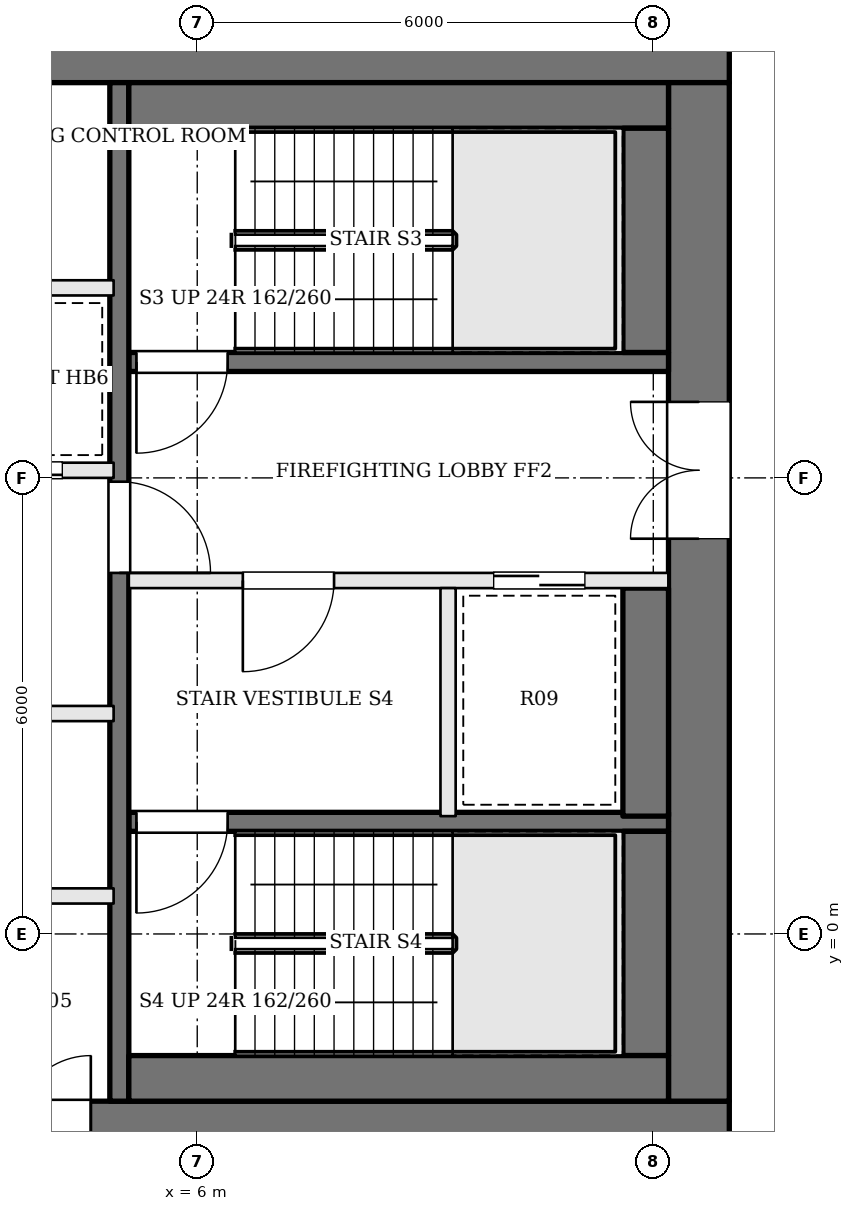
"""IFC4 building model, lengths in metres.
Left out: names, types, materials, properties, quantities, classifications, styles, units other than length and angle.
Written with IfcOpenShell. Run it as: python <this file> out.ifc"""

import sys

from ifc_helpers import new_model, si_unit, direction, frame, frame_2d, origin, place, context, subcontext, project, spatial, rectangle, extrude, element, fill, save


model = new_model("IFC4")
c1 = context("Model", 3, precision=1e-05, world=origin(), true_north=direction((0.0, 1.0)))
c2 = subcontext(c1, "Body", "Model", "MODEL_VIEW")
j1 = project(units=[si_unit("LENGTHUNIT", "METRE"), si_unit("PLANEANGLEUNIT", "RADIAN")], contexts=[c1])
p1 = place(None, origin())
s1 = spatial("IfcSite", under=j1, at=p1, CompositionType="ELEMENT")
p2 = place(p1, origin())
s2 = spatial("IfcBuilding", under=s1, at=p2, CompositionType="ELEMENT")
p3 = place(p2, frame((0.0, 0.0, 197.4)))
s3 = spatial("IfcBuildingStorey", under=s2, at=p3, CompositionType="ELEMENT", Elevation=197.4)
p4 = place(p3, frame((-13.0, 11.6, 0.0), z_axis=(0.0, 0.0, 1.0), x_axis=(1.0, 0.0, 0.0)))
e1 = element("IfcWall", 1, at=p4, inside=s3, PredefinedType="SHEAR", context=c2, shape_type="SweptSolid", body=[
    extrude(rectangle(XDim=26.0, YDim=0.8, at=frame_2d((13.0, 0.0))), origin(), (0.0, 0.0, 1.0), 3.9),
])
p5 = place(p4, frame((8.975, 0.0, 0.0)))
e2 = element("IfcOpeningElement", 2, at=p5, cuts=e1, PredefinedType="OPENING", context=c2, shape_type="SweptSolid", body=[
    extrude(rectangle(XDim=0.7, YDim=2.1, at=frame_2d((0.35, 1.05))), frame((0.0, 0.41, 0.0), z_axis=(0.0, -1.0, 0.0), x_axis=(1.0, 0.0, 0.0)), (0.0, 0.0, 1.0), 0.82),
])
p6 = place(p4, frame((11.025, 0.0, 0.0)))
e3 = element("IfcOpeningElement", 3, at=p6, cuts=e1, PredefinedType="OPENING", context=c2, shape_type="SweptSolid", body=[
    extrude(rectangle(XDim=0.7, YDim=2.1, at=frame_2d((0.35, 1.05))), frame((0.0, 0.41, 0.0), z_axis=(0.0, -1.0, 0.0), x_axis=(1.0, 0.0, 0.0)), (0.0, 0.0, 1.0), 0.82),
])
p7 = place(p4, frame((12.925, 0.0, 0.0)))
e4 = element("IfcOpeningElement", 4, at=p7, cuts=e1, PredefinedType="OPENING", context=c2, shape_type="SweptSolid", body=[
    extrude(rectangle(XDim=1.0, YDim=2.1, at=frame_2d((0.5, 1.05))), frame((0.0, 0.41, 0.0), z_axis=(0.0, -1.0, 0.0), x_axis=(1.0, 0.0, 0.0)), (0.0, 0.0, 1.0), 0.82),
])
p8 = place(p4, frame((15.775, 0.0, 0.0)))
e5 = element("IfcOpeningElement", 5, at=p8, cuts=e1, PredefinedType="OPENING", context=c2, shape_type="SweptSolid", body=[
    extrude(rectangle(XDim=1.0, YDim=2.1, at=frame_2d((0.5, 1.05))), frame((0.0, 0.41, 0.0), z_axis=(0.0, -1.0, 0.0), x_axis=(1.0, 0.0, 0.0)), (0.0, 0.0, 1.0), 0.82),
])
p9 = place(p3, frame((-13.0, -2.6, 0.0), z_axis=(0.0, 0.0, 1.0), x_axis=(1.0, 0.0, 0.0)))
e6 = element("IfcWall", 6, at=p9, inside=s3, PredefinedType="SHEAR", context=c2, shape_type="SweptSolid", body=[
    extrude(rectangle(XDim=26.0, YDim=0.8, at=frame_2d((13.0, 0.0))), origin(), (0.0, 0.0, 1.0), 3.9),
])
p10 = place(p9, frame((8.5, 0.0, 0.0)))
e7 = element("IfcOpeningElement", 7, at=p10, cuts=e6, PredefinedType="OPENING", context=c2, shape_type="SweptSolid", body=[
    extrude(rectangle(XDim=1.0, YDim=2.1, at=frame_2d((0.5, 1.05))), frame((0.0, 0.41, 0.0), z_axis=(0.0, -1.0, 0.0), x_axis=(1.0, 0.0, 0.0)), (0.0, 0.0, 1.0), 0.82),
])
p11 = place(p9, frame((11.025, 0.0, 0.0)))
e8 = element("IfcOpeningElement", 8, at=p11, cuts=e6, PredefinedType="OPENING", context=c2, shape_type="SweptSolid", body=[
    extrude(rectangle(XDim=0.9, YDim=2.1, at=frame_2d((0.45, 1.05))), frame((0.0, 0.41, 0.0), z_axis=(0.0, -1.0, 0.0), x_axis=(1.0, 0.0, 0.0)), (0.0, 0.0, 1.0), 0.82),
])
p12 = place(p9, frame((14.225, 0.0, 0.0)))
e9 = element("IfcOpeningElement", 9, at=p12, cuts=e6, PredefinedType="OPENING", context=c2, shape_type="SweptSolid", body=[
    extrude(rectangle(XDim=0.9, YDim=2.1, at=frame_2d((0.45, 1.05))), frame((0.0, 0.41, 0.0), z_axis=(0.0, -1.0, 0.0), x_axis=(1.0, 0.0, 0.0)), (0.0, 0.0, 1.0), 0.82),
])
p13 = place(p9, frame((16.6, 0.0, 0.0)))
e10 = element("IfcOpeningElement", 10, at=p13, cuts=e6, PredefinedType="OPENING", context=c2, shape_type="SweptSolid", body=[
    extrude(rectangle(XDim=1.0, YDim=2.1, at=frame_2d((0.5, 1.05))), frame((0.0, 0.41, 0.0), z_axis=(0.0, -1.0, 0.0), x_axis=(1.0, 0.0, 0.0)), (0.0, 0.0, 1.0), 0.82),
])
p14 = place(p3, frame((12.6, -2.2, 0.0), z_axis=(0.0, 0.0, 1.0), x_axis=(0.0, 1.0, 0.0)))
e11 = element("IfcWall", 11, at=p14, inside=s3, PredefinedType="SHEAR", context=c2, shape_type="SweptSolid", body=[
    extrude(rectangle(XDim=13.4, YDim=0.8, at=frame_2d((6.7, 0.0))), origin(), (0.0, 0.0, 1.0), 3.9),
])
p15 = place(p14, frame((7.4, 0.0, 0.0)))
e12 = element("IfcOpeningElement", 12, at=p15, cuts=e11, PredefinedType="OPENING", context=c2, shape_type="SweptSolid", body=[
    extrude(rectangle(XDim=1.8, YDim=2.1, at=frame_2d((0.9, 1.05))), frame((0.0, 0.41, 0.0), z_axis=(0.0, -1.0, 0.0), x_axis=(1.0, 0.0, 0.0)), (0.0, 0.0, 1.0), 0.82),
])
p16 = place(p3, frame((12.2, 7.525, 0.0), z_axis=(0.0, 0.0, 1.0), x_axis=(-1.0, 0.0, 0.0)))
e13 = element("IfcWall", 13, at=p16, inside=s3, PredefinedType="SOLIDWALL", context=c2, shape_type="SweptSolid", body=[
    extrude(rectangle(XDim=7.1, YDim=0.25, at=frame_2d((3.55, 0.0))), origin(), (0.0, 0.0, 1.0), 3.7),
])
p17 = place(p16, frame((5.8, 0.0, 0.0)))
e14 = element("IfcOpeningElement", 14, at=p17, cuts=e13, PredefinedType="OPENING", context=c2, shape_type="SweptSolid", body=[
    extrude(rectangle(XDim=1.2, YDim=2.1, at=frame_2d((0.6, 1.05))), frame((0.0, 0.135, 0.0), z_axis=(0.0, -1.0, 0.0), x_axis=(1.0, 0.0, 0.0)), (0.0, 0.0, 1.0), 0.27),
])
p18 = place(p3, frame((12.2, 4.65, 0.0), z_axis=(0.0, 0.0, 1.0), x_axis=(-1.0, 0.0, 0.0)))
e15 = element("IfcWall", 15, at=p18, inside=s3, PredefinedType="SOLIDWALL", context=c2, shape_type="SweptSolid", body=[
    extrude(rectangle(XDim=7.1, YDim=0.2, at=frame_2d((3.55, 0.0))), origin(), (0.0, 0.0, 1.0), 3.7),
])
p19 = place(p18, frame((4.4, 0.0, 0.0)))
e16 = element("IfcOpeningElement", 16, at=p19, cuts=e15, PredefinedType="OPENING", context=c2, shape_type="SweptSolid", body=[
    extrude(rectangle(XDim=1.2, YDim=2.1, at=frame_2d((0.6, 1.05))), frame((0.0, 0.11, 0.0), z_axis=(0.0, -1.0, 0.0), x_axis=(1.0, 0.0, 0.0)), (0.0, 0.0, 1.0), 0.22),
])
p20 = place(p18, frame((1.1, 0.0, 0.0)))
e17 = element("IfcOpeningElement", 17, at=p20, cuts=e15, PredefinedType="OPENING", context=c2, shape_type="SweptSolid", body=[
    extrude(rectangle(XDim=1.2, YDim=2.1, at=frame_2d((0.6, 1.05))), frame((0.0, 0.11, 0.0), z_axis=(0.0, -1.0, 0.0), x_axis=(1.0, 0.0, 0.0)), (0.0, 0.0, 1.0), 0.22),
])
p21 = place(p3, frame((12.2, 1.475, 0.0), z_axis=(0.0, 0.0, 1.0), x_axis=(-1.0, 0.0, 0.0)))
e18 = element("IfcWall", 18, at=p21, inside=s3, PredefinedType="SOLIDWALL", context=c2, shape_type="SweptSolid", body=[
    extrude(rectangle(XDim=7.1, YDim=0.25, at=frame_2d((3.55, 0.0))), origin(), (0.0, 0.0, 1.0), 3.7),
])
p22 = place(p21, frame((5.8, 0.0, 0.0)))
e19 = element("IfcOpeningElement", 19, at=p22, cuts=e18, PredefinedType="OPENING", context=c2, shape_type="SweptSolid", body=[
    extrude(rectangle(XDim=1.2, YDim=2.1, at=frame_2d((0.6, 1.05))), frame((0.0, 0.135, 0.0), z_axis=(0.0, -1.0, 0.0), x_axis=(1.0, 0.0, 0.0)), (0.0, 0.0, 1.0), 0.27),
])
p23 = place(p3, frame((9.3, 4.55, 0.0), z_axis=(0.0, 0.0, 1.0), x_axis=(0.0, -1.0, 0.0)))
e20 = element("IfcWall", 20, at=p23, inside=s3, PredefinedType="SOLIDWALL", context=c2, shape_type="SweptSolid", body=[
    extrude(rectangle(XDim=3.0, YDim=0.2, at=frame_2d((1.5, 0.0))), origin(), (0.0, 0.0, 1.0), 3.7),
])
p24 = place(p3, frame((4.975, 11.2, 0.0), z_axis=(0.0, 0.0, 1.0), x_axis=(0.0, -1.0, 0.0)))
e21 = element("IfcWall", 21, at=p24, inside=s3, PredefinedType="SOLIDWALL", context=c2, shape_type="SweptSolid", body=[
    extrude(rectangle(XDim=13.4, YDim=0.25, at=frame_2d((6.7, 0.0))), origin(), (0.0, 0.0, 1.0), 3.7),
])
p25 = place(p24, frame((5.25, 0.0, 0.0)))
e22 = element("IfcOpeningElement", 22, at=p25, cuts=e21, PredefinedType="OPENING", context=c2, shape_type="SweptSolid", body=[
    extrude(rectangle(XDim=1.2, YDim=2.1, at=frame_2d((0.6, 1.05))), frame((0.0, 0.135, 0.0), z_axis=(0.0, -1.0, 0.0), x_axis=(1.0, 0.0, 0.0)), (0.0, 0.0, 1.0), 0.27),
])
p26 = place(p3, frame((12.2, 10.9, 0.0), z_axis=(0.0, 0.0, 1.0), x_axis=(-1.0, 0.0, 0.0)))
e23 = element("IfcWall", 23, at=p26, inside=s3, PredefinedType="SOLIDWALL", context=c2, shape_type="SweptSolid", body=[
    extrude(rectangle(XDim=7.1, YDim=0.6, at=frame_2d((3.55, 0.0))), origin(), (0.0, 0.0, 1.0), 3.7),
])
p27 = place(p3, frame((11.9, 10.6, 0.0), z_axis=(0.0, 0.0, 1.0), x_axis=(0.0, -1.0, 0.0)))
e24 = element("IfcWall", 24, at=p27, inside=s3, PredefinedType="SOLIDWALL", context=c2, shape_type="SweptSolid", body=[
    extrude(rectangle(XDim=2.95, YDim=0.6, at=frame_2d((1.475, 0.0))), origin(), (0.0, 0.0, 1.0), 3.7),
])
p28 = place(p3, frame((11.9, 4.55, 0.0), z_axis=(0.0, 0.0, 1.0), x_axis=(0.0, -1.0, 0.0)))
e25 = element("IfcWall", 25, at=p28, inside=s3, PredefinedType="SOLIDWALL", context=c2, shape_type="SweptSolid", body=[
    extrude(rectangle(XDim=3.0, YDim=0.6, at=frame_2d((1.5, 0.0))), origin(), (0.0, 0.0, 1.0), 3.7),
])
p29 = place(p3, frame((11.9, 1.35, 0.0), z_axis=(0.0, 0.0, 1.0), x_axis=(0.0, -1.0, 0.0)))
e26 = element("IfcWall", 26, at=p29, inside=s3, PredefinedType="SOLIDWALL", context=c2, shape_type="SweptSolid", body=[
    extrude(rectangle(XDim=2.95, YDim=0.6, at=frame_2d((1.475, 0.0))), origin(), (0.0, 0.0, 1.0), 3.7),
])
p30 = place(p3, frame((12.2, -1.9, 0.0), z_axis=(0.0, 0.0, 1.0), x_axis=(-1.0, 0.0, 0.0)))
e27 = element("IfcWall", 27, at=p30, inside=s3, PredefinedType="SOLIDWALL", context=c2, shape_type="SweptSolid", body=[
    extrude(rectangle(XDim=7.1, YDim=0.6, at=frame_2d((3.55, 0.0))), origin(), (0.0, 0.0, 1.0), 3.7),
])
p31 = place(p3, frame((-4.9, 0.5, 0.0), z_axis=(0.0, 0.0, 1.0), x_axis=(1.0, 0.0, 0.0)))
e28 = element("IfcWall", 28, at=p31, inside=s3, PredefinedType="SOLIDWALL", context=c2, shape_type="SweptSolid", body=[
    extrude(rectangle(XDim=9.8, YDim=0.2, at=frame_2d((4.9, 0.0))), origin(), (0.0, 0.0, 1.0), 3.7),
])
p32 = place(p3, frame((-4.9, 2.9, 0.0), z_axis=(0.0, 0.0, 1.0), x_axis=(1.0, 0.0, 0.0)))
e29 = element("IfcWall", 29, at=p32, inside=s3, PredefinedType="SOLIDWALL", context=c2, shape_type="SweptSolid", body=[
    extrude(rectangle(XDim=9.8, YDim=0.2, at=frame_2d((4.9, 0.0))), origin(), (0.0, 0.0, 1.0), 3.7),
])
p33 = place(p32, frame((0.675, 0.0, 0.0)))
e30 = element("IfcOpeningElement", 30, at=p33, cuts=e29, PredefinedType="OPENING", context=c2, shape_type="SweptSolid", body=[
    extrude(rectangle(XDim=1.1, YDim=2.1, at=frame_2d((0.55, 1.05))), frame((0.0, 0.11, 0.0), z_axis=(0.0, -1.0, 0.0), x_axis=(1.0, 0.0, 0.0)), (0.0, 0.0, 1.0), 0.22),
])
p34 = place(p32, frame((2.613, 0.0, 0.0)))
e31 = element("IfcOpeningElement", 31, at=p34, cuts=e29, PredefinedType="OPENING", context=c2, shape_type="SweptSolid", body=[
    extrude(rectangle(XDim=0.9, YDim=2.1, at=frame_2d((0.45, 1.05))), frame((0.0, 0.11, 0.0), z_axis=(0.0, -1.0, 0.0), x_axis=(1.0, 0.0, 0.0)), (0.0, 0.0, 1.0), 0.22),
])
p35 = place(p32, frame((4.35, 0.0, 0.0)))
e32 = element("IfcOpeningElement", 32, at=p35, cuts=e29, PredefinedType="OPENING", context=c2, shape_type="SweptSolid", body=[
    extrude(rectangle(XDim=1.1, YDim=2.1, at=frame_2d((0.55, 1.05))), frame((0.0, 0.11, 0.0), z_axis=(0.0, -1.0, 0.0), x_axis=(1.0, 0.0, 0.0)), (0.0, 0.0, 1.0), 0.22),
])
p36 = place(p32, frame((7.463, 0.0, 0.0)))
e33 = element("IfcOpeningElement", 33, at=p36, cuts=e29, PredefinedType="OPENING", context=c2, shape_type="SweptSolid", body=[
    extrude(rectangle(XDim=1.0, YDim=2.1, at=frame_2d((0.5, 1.05))), frame((0.0, 0.11, 0.0), z_axis=(0.0, -1.0, 0.0), x_axis=(1.0, 0.0, 0.0)), (0.0, 0.0, 1.0), 0.22),
])
p37 = place(p3, frame((-4.9, 6.1, 0.0), z_axis=(0.0, 0.0, 1.0), x_axis=(1.0, 0.0, 0.0)))
e34 = element("IfcWall", 34, at=p37, inside=s3, PredefinedType="SOLIDWALL", context=c2, shape_type="SweptSolid", body=[
    extrude(rectangle(XDim=9.8, YDim=0.2, at=frame_2d((4.9, 0.0))), origin(), (0.0, 0.0, 1.0), 3.7),
])
p38 = place(p37, frame((0.675, 0.0, 0.0)))
e35 = element("IfcOpeningElement", 35, at=p38, cuts=e34, PredefinedType="OPENING", context=c2, shape_type="SweptSolid", body=[
    extrude(rectangle(XDim=1.1, YDim=2.1, at=frame_2d((0.55, 1.05))), frame((0.0, 0.11, 0.0), z_axis=(0.0, -1.0, 0.0), x_axis=(1.0, 0.0, 0.0)), (0.0, 0.0, 1.0), 0.22),
])
p39 = place(p37, frame((3.125, 0.0, 0.0)))
e36 = element("IfcOpeningElement", 36, at=p39, cuts=e34, PredefinedType="OPENING", context=c2, shape_type="SweptSolid", body=[
    extrude(rectangle(XDim=1.1, YDim=2.1, at=frame_2d((0.55, 1.05))), frame((0.0, 0.11, 0.0), z_axis=(0.0, -1.0, 0.0), x_axis=(1.0, 0.0, 0.0)), (0.0, 0.0, 1.0), 0.22),
])
p40 = place(p37, frame((5.575, 0.0, 0.0)))
e37 = element("IfcOpeningElement", 37, at=p40, cuts=e34, PredefinedType="OPENING", context=c2, shape_type="SweptSolid", body=[
    extrude(rectangle(XDim=1.1, YDim=2.1, at=frame_2d((0.55, 1.05))), frame((0.0, 0.11, 0.0), z_axis=(0.0, -1.0, 0.0), x_axis=(1.0, 0.0, 0.0)), (0.0, 0.0, 1.0), 0.22),
])
p41 = place(p37, frame((8.025, 0.0, 0.0)))
e38 = element("IfcOpeningElement", 38, at=p41, cuts=e34, PredefinedType="OPENING", context=c2, shape_type="SweptSolid", body=[
    extrude(rectangle(XDim=1.1, YDim=2.1, at=frame_2d((0.55, 1.05))), frame((0.0, 0.11, 0.0), z_axis=(0.0, -1.0, 0.0), x_axis=(1.0, 0.0, 0.0)), (0.0, 0.0, 1.0), 0.22),
])
p42 = place(p3, frame((-4.9, 8.5, 0.0), z_axis=(0.0, 0.0, 1.0), x_axis=(1.0, 0.0, 0.0)))
e39 = element("IfcWall", 39, at=p42, inside=s3, PredefinedType="SOLIDWALL", context=c2, shape_type="SweptSolid", body=[
    extrude(rectangle(XDim=9.8, YDim=0.2, at=frame_2d((4.9, 0.0))), origin(), (0.0, 0.0, 1.0), 3.7),
])
p43 = place(p15, origin())
e40 = element("IfcDoor", 40, at=p43, inside=s3, OperationType="DOUBLE_DOOR_SINGLE_SWING", PredefinedType="DOOR", context=c2, shape_type="SweptSolid", body=[
    extrude(rectangle(XDim=1.8, YDim=2.1, at=frame_2d((0.9, 1.05))), frame((0.0, 0.025, 0.0), z_axis=(0.0, -1.0, 0.0), x_axis=(1.0, 0.0, 0.0)), (0.0, 0.0, 1.0), 0.05),
])
fill(e12, e40)
p44 = place(p25, origin())
e41 = element("IfcDoor", 41, at=p44, inside=s3, OperationType="SINGLE_SWING_RIGHT", PredefinedType="DOOR", context=c2, shape_type="SweptSolid", body=[
    extrude(rectangle(XDim=1.2, YDim=2.1, at=frame_2d((0.6, 1.05))), frame((0.0, 0.025, 0.0), z_axis=(0.0, -1.0, 0.0), x_axis=(1.0, 0.0, 0.0)), (0.0, 0.0, 1.0), 0.05),
])
fill(e22, e41)
p45 = place(p19, origin())
e42 = element("IfcDoor", 42, at=p45, inside=s3, OperationType="SINGLE_SWING_RIGHT", PredefinedType="DOOR", context=c2, shape_type="SweptSolid", body=[
    extrude(rectangle(XDim=1.2, YDim=2.1, at=frame_2d((0.6, 1.05))), frame((0.0, 0.025, 0.0), z_axis=(0.0, -1.0, 0.0), x_axis=(1.0, 0.0, 0.0)), (0.0, 0.0, 1.0), 0.05),
])
fill(e16, e42)
p46 = place(p17, origin())
e43 = element("IfcDoor", 43, at=p46, inside=s3, OperationType="SINGLE_SWING_RIGHT", PredefinedType="DOOR", context=c2, shape_type="SweptSolid", body=[
    extrude(rectangle(XDim=1.2, YDim=2.1, at=frame_2d((0.6, 1.05))), frame((0.0, 0.025, 0.0), z_axis=(0.0, -1.0, 0.0), x_axis=(1.0, 0.0, 0.0)), (0.0, 0.0, 1.0), 0.05),
])
fill(e14, e43)
p47 = place(p22, origin())
e44 = element("IfcDoor", 44, at=p47, inside=s3, OperationType="SINGLE_SWING_RIGHT", PredefinedType="DOOR", context=c2, shape_type="SweptSolid", body=[
    extrude(rectangle(XDim=1.2, YDim=2.1, at=frame_2d((0.6, 1.05))), frame((0.0, 0.025, 0.0), z_axis=(0.0, -1.0, 0.0), x_axis=(1.0, 0.0, 0.0)), (0.0, 0.0, 1.0), 0.05),
])
fill(e19, e44)
p48 = place(p20, origin())
e45 = element("IfcDoor", 45, at=p48, inside=s3, OperationType="SLIDING_TO_RIGHT", PredefinedType="DOOR", context=c2, shape_type="SweptSolid", body=[
    extrude(rectangle(XDim=1.2, YDim=2.1, at=frame_2d((0.6, 1.05))), frame((0.0, 0.025, 0.0), z_axis=(0.0, -1.0, 0.0), x_axis=(1.0, 0.0, 0.0)), (0.0, 0.0, 1.0), 0.05),
])
fill(e17, e45)
p49 = place(p41, origin())
e46 = element("IfcDoor", 46, at=p49, inside=s3, OperationType="SLIDING_TO_LEFT", PredefinedType="DOOR", context=c2, shape_type="SweptSolid", body=[
    extrude(rectangle(XDim=1.1, YDim=2.1, at=frame_2d((0.55, 1.05))), frame((0.0, 0.025, 0.0), z_axis=(0.0, -1.0, 0.0), x_axis=(1.0, 0.0, 0.0)), (0.0, 0.0, 1.0), 0.05),
])
fill(e38, e46)
p50 = place(p13, origin())
e47 = element("IfcDoor", 47, at=p50, inside=s3, OperationType="SINGLE_SWING_RIGHT", PredefinedType="DOOR", context=c2, shape_type="SweptSolid", body=[
    extrude(rectangle(XDim=1.0, YDim=2.1, at=frame_2d((0.5, 1.05))), frame((0.0, 0.025, 0.0), z_axis=(0.0, -1.0, 0.0), x_axis=(1.0, 0.0, 0.0)), (0.0, 0.0, 1.0), 0.05),
])
fill(e10, e47)
save(model, sys.argv[1])
